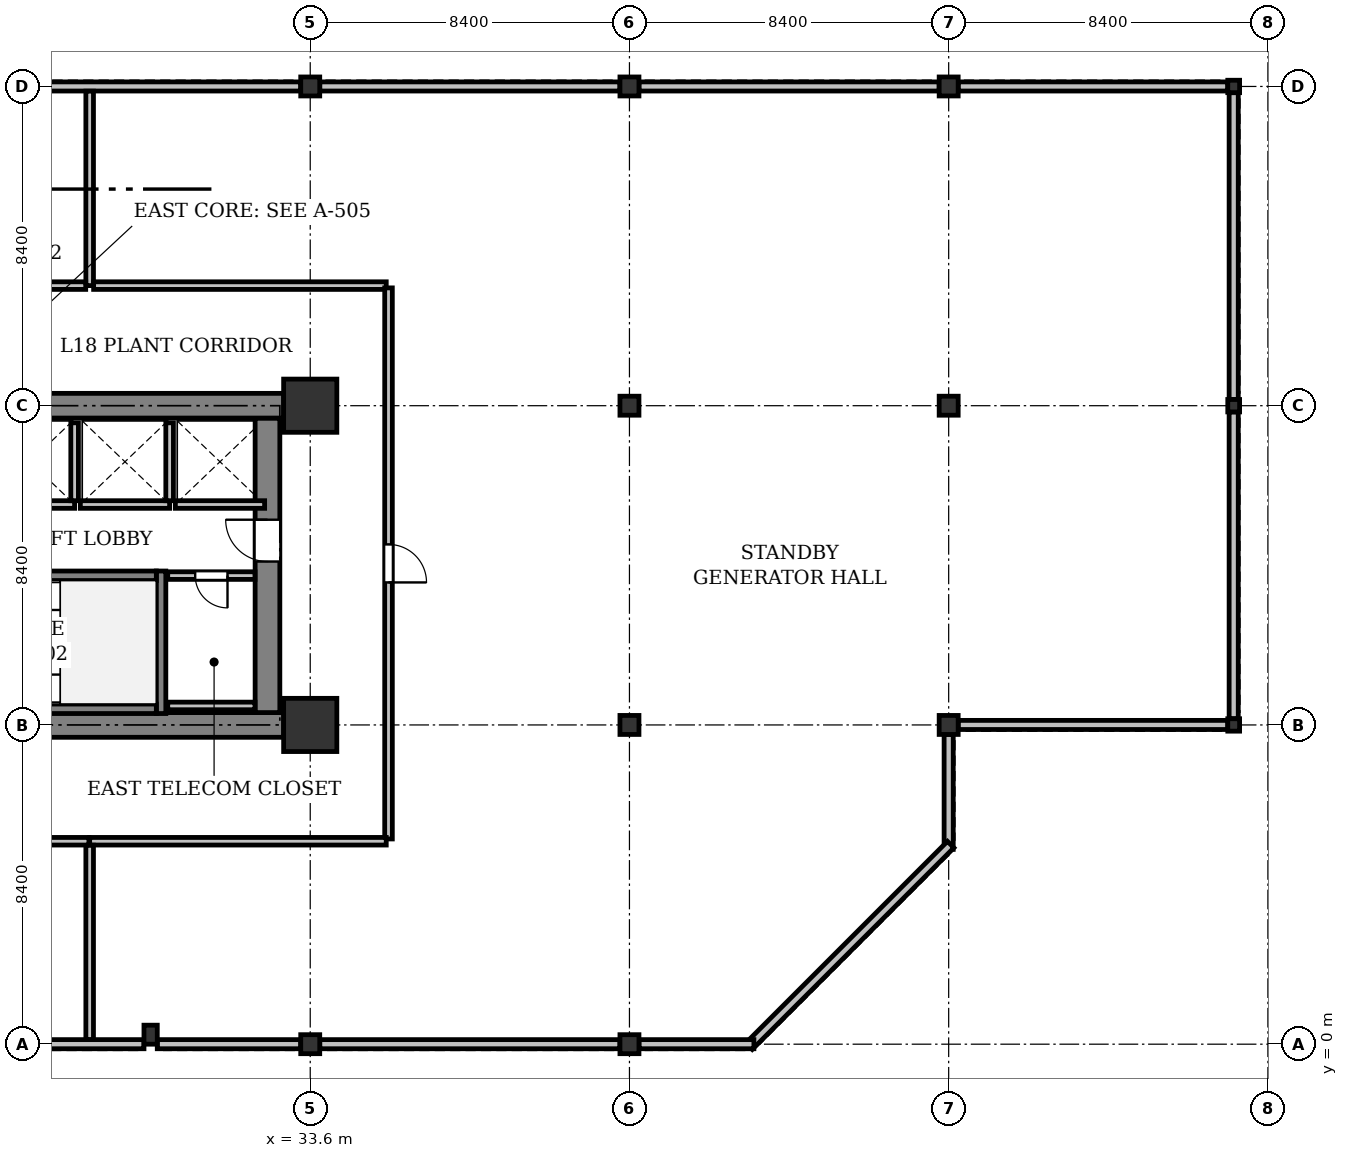
"""IFC4 building model, lengths in metres.
Left out: names, types, materials, properties, quantities, classifications, styles, units other than length and angle.
Written with IfcOpenShell. Run it as: python <this file> out.ifc"""

import sys

from ifc_helpers import new_model, si_unit, direction, frame, frame_2d, origin, origin_2d, place, context, subcontext, project, spatial, rectangle, i_section, extrude, element, fill, save


model = new_model("IFC4")
c1 = context("Model", 3, precision=1e-05, world=origin(), true_north=direction((0.0, 1.0)))
c2 = subcontext(c1, "Body", "Model", "MODEL_VIEW")
j1 = project(units=[si_unit("LENGTHUNIT", "METRE"), si_unit("PLANEANGLEUNIT", "RADIAN")], contexts=[c1])
p1 = place(None, origin())
s1 = spatial("IfcSite", under=j1, at=p1, CompositionType="ELEMENT")
p2 = place(p1, origin())
s2 = spatial("IfcBuilding", under=s1, at=p2, CompositionType="ELEMENT")
p3 = place(p2, frame((0.0, 0.0, 79.4)))
s3 = spatial("IfcBuildingStorey", under=s2, at=p3, CompositionType="ELEMENT", Elevation=79.4)
p4 = place(p3, frame((33.6, 0.0, 0.0), z_axis=(0.0, 0.0, 1.0), x_axis=(1.0, 0.0, 0.0)))
e1 = element("IfcColumn", 1, at=p4, inside=s3, PredefinedType="COLUMN", context=c2, shape_type="SweptSolid", body=[
    extrude(i_section(OverallWidth=0.5, OverallDepth=0.5, WebThickness=0.028, FlangeThickness=0.04, at=origin_2d()), origin(), (0.0, 0.0, 1.0), 5.0),
])
for number, where, z_axis, x_axis in (
    (2, (33.6, 8.4, 0.0), (0.0, 0.0, 1.0), (1.0, 0.0, 0.0)),
    (3, (33.6, 16.8, 0.0), (0.0, 0.0, 1.0), (1.0, 0.0, 0.0)),
):
    element("IfcColumn", number, at=place(p3, frame(where, z_axis=z_axis, x_axis=x_axis)), inside=s3, PredefinedType="COLUMN", context=c2, shape_type="SweptSolid", body=[
        extrude(rectangle(XDim=1.4, YDim=1.4, at=origin_2d()), origin(), (0.0, 0.0, 1.0), 5.0),
    ])
for number, where, z_axis, x_axis in (
    (4, (33.6, 25.2, 0.0), (0.0, 0.0, 1.0), (1.0, 0.0, 0.0)),
    (5, (42.0, 0.0, 0.0), (0.0, 0.0, 1.0), (1.0, 0.0, 0.0)),
    (6, (42.0, 8.4, 0.0), (0.0, 0.0, 1.0), (1.0, 0.0, 0.0)),
    (7, (42.0, 16.8, 0.0), (0.0, 0.0, 1.0), (1.0, 0.0, 0.0)),
    (8, (42.0, 25.2, 0.0), (0.0, 0.0, 1.0), (1.0, 0.0, 0.0)),
    (9, (50.4, 8.4, 0.0), (0.0, 0.0, 1.0), (1.0, 0.0, 0.0)),
    (10, (50.4, 16.8, 0.0), (0.0, 0.0, 1.0), (1.0, 0.0, 0.0)),
    (11, (50.4, 25.2, 0.0), (0.0, 0.0, 1.0), (1.0, 0.0, 0.0)),
):
    element("IfcColumn", number, at=place(p3, frame(where, z_axis=z_axis, x_axis=x_axis)), inside=s3, PredefinedType="COLUMN", context=c2, shape_type="SweptSolid", body=[
        extrude(i_section(OverallWidth=0.5, OverallDepth=0.5, WebThickness=0.028, FlangeThickness=0.04, at=origin_2d()), origin(), (0.0, 0.0, 1.0), 5.0),
    ])
for number, where, z_axis, x_axis in (
    (12, (57.9, 8.4, 0.0), (0.0, 0.0, 1.0), (1.0, 0.0, 0.0)),
    (13, (57.9, 16.8, 0.0), (0.0, 0.0, 1.0), (1.0, 0.0, 0.0)),
    (14, (57.9, 25.2, 0.0), (0.0, 0.0, 1.0), (1.0, 0.0, 0.0)),
):
    element("IfcColumn", number, at=place(p3, frame(where, z_axis=z_axis, x_axis=x_axis)), inside=s3, PredefinedType="COLUMN", context=c2, shape_type="SweptSolid", body=[
        extrude(i_section(OverallWidth=0.311, OverallDepth=0.327, WebThickness=0.016, FlangeThickness=0.025, FilletRadius=0.017, at=origin_2d()), origin(), (0.0, 0.0, 1.0), 5.0),
    ])
p5 = place(p3, frame((29.4, 0.25, 0.0), z_axis=(0.0, 0.0, 1.0), x_axis=(1.0, 0.0, 0.0)))
e15 = element("IfcColumn", 15, at=p5, inside=s3, PredefinedType="PILASTER", context=c2, shape_type="SweptSolid", body=[
    extrude(rectangle(XDim=0.35, YDim=0.5, at=origin_2d()), origin(), (0.0, 0.0, 1.0), 5.0),
])
p6 = place(p3, frame((57.9, 25.037, 0.0), z_axis=(0.0, 0.0, 1.0), x_axis=(0.0, -1.0, 0.0)))
e16 = element("IfcWall", 16, at=p6, inside=s3, PredefinedType="STANDARD", context=c2, shape_type="SweptSolid", body=[
    extrude(rectangle(XDim=8.073, YDim=0.24, at=frame_2d((4.037, 0.0))), origin(), (0.0, 0.0, 1.0), 4.322),
])
p7 = place(p3, frame((57.9, 16.636, 0.0), z_axis=(0.0, 0.0, 1.0), x_axis=(0.0, -1.0, 0.0)))
e17 = element("IfcWall", 17, at=p7, inside=s3, PredefinedType="STANDARD", context=c2, shape_type="SweptSolid", body=[
    extrude(rectangle(XDim=8.073, YDim=0.24, at=frame_2d((4.037, 0.0))), origin(), (0.0, 0.0, 1.0), 4.322),
])
p8 = place(p3, frame((57.744, 8.4, 0.0), z_axis=(0.0, 0.0, 1.0), x_axis=(-1.0, 0.0, 0.0)))
e18 = element("IfcWall", 18, at=p8, inside=s3, PredefinedType="STANDARD", context=c2, shape_type="SweptSolid", body=[
    extrude(rectangle(XDim=7.094, YDim=0.24, at=frame_2d((3.547, 0.0))), origin(), (0.0, 0.0, 1.0), 3.815),
])
p9 = place(p3, frame((50.4, 8.15, 0.0), z_axis=(0.0, 0.0, 1.0), x_axis=(0.0, -1.0, 0.0)))
e19 = element("IfcWall", 19, at=p9, inside=s3, PredefinedType="STANDARD", context=c2, shape_type="SweptSolid", body=[
    extrude(rectangle(XDim=3.025, YDim=0.24, at=frame_2d((1.512, 0.0))), origin(), (0.0, 0.0, 1.0), 4.725),
])
p10 = place(p3, frame((50.453, 5.253, 0.0), z_axis=(0.0, 0.0, 1.0), x_axis=(-0.707123050166, -0.707090511833, 0.0)))
e20 = element("IfcWall", 20, at=p10, inside=s3, PredefinedType="STANDARD", context=c2, shape_type="SweptSolid", body=[
    extrude(rectangle(XDim=7.503, YDim=0.24, at=frame_2d((3.751, 0.0))), origin(), (0.0, 0.0, 1.0), 4.725),
])
p11 = place(p3, frame((45.275, 0.0, 0.0), z_axis=(0.0, 0.0, 1.0), x_axis=(-1.0, 0.0, 0.0)))
e21 = element("IfcWall", 21, at=p11, inside=s3, PredefinedType="STANDARD", context=c2, shape_type="SweptSolid", body=[
    extrude(rectangle(XDim=3.025, YDim=0.24, at=frame_2d((1.512, 0.0))), origin(), (0.0, 0.0, 1.0), 4.725),
])
p12 = place(p3, frame((41.75, 0.0, 0.0), z_axis=(0.0, 0.0, 1.0), x_axis=(-1.0, 0.0, 0.0)))
e22 = element("IfcWall", 22, at=p12, inside=s3, PredefinedType="STANDARD", context=c2, shape_type="SweptSolid", body=[
    extrude(rectangle(XDim=7.9, YDim=0.24, at=frame_2d((3.95, 0.0))), origin(), (0.0, 0.0, 1.0), 4.425),
])
for number, where, z_axis, x_axis in (
    (23, (33.35, 0.0, 0.0), (0.0, 0.0, 1.0), (-1.0, 0.0, 0.0)),
    (24, (29.225, 0.0, 0.0), (0.0, 0.0, 1.0), (-1.0, 0.0, 0.0)),
):
    element("IfcWall", number, at=place(p3, frame(where, z_axis=z_axis, x_axis=x_axis)), inside=s3, PredefinedType="STANDARD", context=c2, shape_type="SweptSolid", body=[
        extrude(rectangle(XDim=3.775, YDim=0.24, at=frame_2d((1.888, 0.0))), origin(), (0.0, 0.0, 1.0), 4.425),
    ])
p13 = place(p3, frame((25.45, 25.2, 0.0), z_axis=(0.0, 0.0, 1.0), x_axis=(1.0, 0.0, 0.0)))
e25 = element("IfcWall", 25, at=p13, inside=s3, PredefinedType="STANDARD", context=c2, shape_type="SweptSolid", body=[
    extrude(rectangle(XDim=7.9, YDim=0.24, at=frame_2d((3.95, 0.0))), origin(), (0.0, 0.0, 1.0), 3.825),
])
for number, where, z_axis, x_axis in (
    (26, (33.85, 25.2, 0.0), (0.0, 0.0, 1.0), (1.0, 0.0, 0.0)),
    (27, (42.25, 25.2, 0.0), (0.0, 0.0, 1.0), (1.0, 0.0, 0.0)),
):
    element("IfcWall", number, at=place(p3, frame(where, z_axis=z_axis, x_axis=x_axis)), inside=s3, PredefinedType="STANDARD", context=c2, shape_type="SweptSolid", body=[
        extrude(rectangle(XDim=7.9, YDim=0.24, at=frame_2d((3.95, 0.0))), origin(), (0.0, 0.0, 1.0), 3.825),
    ])
p14 = place(p3, frame((50.65, 25.2, 0.0), z_axis=(0.0, 0.0, 1.0), x_axis=(1.0, 0.0, 0.0)))
e28 = element("IfcWall", 28, at=p14, inside=s3, PredefinedType="STANDARD", context=c2, shape_type="SweptSolid", body=[
    extrude(rectangle(XDim=7.094, YDim=0.24, at=frame_2d((3.547, 0.0))), origin(), (0.0, 0.0, 1.0), 3.815),
])
p15 = place(p3, frame((25.9, 8.4, 0.0), z_axis=(0.0, 0.0, 1.0), x_axis=(1.0, 0.0, 0.0)))
e29 = element("IfcWall", 29, at=p15, inside=s3, PredefinedType="SHEAR", context=c2, shape_type="SweptSolid", body=[
    extrude(rectangle(XDim=7.0, YDim=0.65, at=frame_2d((3.5, 0.0))), origin(), (0.0, 0.0, 1.0), 4.725),
])
p16 = place(p3, frame((32.475, 8.725, 0.0), z_axis=(0.0, 0.0, 1.0), x_axis=(0.0, 1.0, 0.0)))
e30 = element("IfcWall", 30, at=p16, inside=s3, PredefinedType="SHEAR", context=c2, shape_type="SweptSolid", body=[
    extrude(rectangle(XDim=7.75, YDim=0.65, at=frame_2d((3.875, 0.0))), origin(), (0.0, 0.0, 1.0), 4.725),
])
p17 = place(p16, frame((3.975, 0.0, 0.0)))
e31 = element("IfcOpeningElement", 31, at=p17, cuts=e30, PredefinedType="OPENING", context=c2, shape_type="SweptSolid", body=[
    extrude(rectangle(XDim=1.1, YDim=2.15, at=frame_2d((0.55, 1.075))), frame((0.0, 0.335, 0.0), z_axis=(0.0, -1.0, 0.0), x_axis=(1.0, 0.0, 0.0)), (0.0, 0.0, 1.0), 0.67),
])
p18 = place(p3, frame((25.9, 16.8, 0.0), z_axis=(0.0, 0.0, 1.0), x_axis=(1.0, 0.0, 0.0)))
e32 = element("IfcWall", 32, at=p18, inside=s3, PredefinedType="SHEAR", context=c2, shape_type="SweptSolid", body=[
    extrude(rectangle(XDim=7.0, YDim=0.65, at=frame_2d((3.5, 0.0))), origin(), (0.0, 0.0, 1.0), 4.725),
])
p19 = place(p3, frame((29.675, 8.7, 0.0), z_axis=(0.0, 0.0, 1.0), x_axis=(0.0, 1.0, 0.0)))
e33 = element("IfcWall", 33, at=p19, inside=s3, PredefinedType="SHEAR", context=c2, shape_type="SweptSolid", body=[
    extrude(rectangle(XDim=3.75, YDim=0.25, at=frame_2d((1.875, 0.0))), origin(), (0.0, 0.0, 1.0), 4.725),
])
p20 = place(p3, frame((21.8, 8.825, 0.0), z_axis=(0.0, 0.0, 1.0), x_axis=(1.0, 0.0, 0.0)))
e34 = element("IfcWall", 34, at=p20, inside=s3, PredefinedType="SHEAR", context=c2, shape_type="SweptSolid", body=[
    extrude(rectangle(XDim=7.75, YDim=0.25, at=frame_2d((3.875, 0.0))), origin(), (0.0, 0.0, 1.0), 4.725),
])
p21 = place(p3, frame((21.8, 12.325, 0.0), z_axis=(0.0, 0.0, 1.0), x_axis=(1.0, 0.0, 0.0)))
e35 = element("IfcWall", 35, at=p21, inside=s3, PredefinedType="SHEAR", context=c2, shape_type="SweptSolid", body=[
    extrude(rectangle(XDim=7.75, YDim=0.25, at=frame_2d((3.875, 0.0))), origin(), (0.0, 0.0, 1.0), 4.725),
])
p22 = place(p21, frame((0.22, 0.0, 0.0)))
e36 = element("IfcOpeningElement", 36, at=p22, cuts=e35, PredefinedType="OPENING", context=c2, shape_type="SweptSolid", body=[
    extrude(rectangle(XDim=1.1, YDim=2.15, at=frame_2d((0.55, 1.075))), frame((0.0, 0.135, 0.0), z_axis=(0.0, -1.0, 0.0), x_axis=(1.0, 0.0, 0.0)), (0.0, 0.0, 1.0), 0.27),
])
p23 = place(p3, frame((25.05, 14.2, 0.0), z_axis=(0.0, 0.0, 1.0), x_axis=(1.0, 0.0, 0.0)))
e37 = element("IfcWall", 37, at=p23, inside=s3, PredefinedType="PARTITIONING", context=c2, shape_type="SweptSolid", body=[
    extrude(rectangle(XDim=2.35, YDim=0.2, at=frame_2d((1.175, 0.0))), origin(), (0.0, 0.0, 1.0), 4.725),
])
p24 = place(p3, frame((27.4, 14.3, 0.0), z_axis=(0.0, 0.0, 1.0), x_axis=(0.0, 1.0, 0.0)))
e38 = element("IfcWall", 38, at=p24, inside=s3, PredefinedType="PARTITIONING", context=c2, shape_type="SweptSolid", body=[
    extrude(rectangle(XDim=2.05, YDim=0.2, at=frame_2d((1.025, 0.0))), origin(), (0.0, 0.0, 1.0), 4.725),
])
p25 = place(p3, frame((27.55, 14.2, 0.0), z_axis=(0.0, 0.0, 1.0), x_axis=(1.0, 0.0, 0.0)))
e39 = element("IfcWall", 39, at=p25, inside=s3, PredefinedType="PARTITIONING", context=c2, shape_type="SweptSolid", body=[
    extrude(rectangle(XDim=2.35, YDim=0.2, at=frame_2d((1.175, 0.0))), origin(), (0.0, 0.0, 1.0), 4.725),
])
p26 = place(p3, frame((29.9, 14.3, 0.0), z_axis=(0.0, 0.0, 1.0), x_axis=(0.0, 1.0, 0.0)))
e40 = element("IfcWall", 40, at=p26, inside=s3, PredefinedType="PARTITIONING", context=c2, shape_type="SweptSolid", body=[
    extrude(rectangle(XDim=2.05, YDim=0.2, at=frame_2d((1.025, 0.0))), origin(), (0.0, 0.0, 1.0), 4.725),
])
p27 = place(p3, frame((30.05, 14.2, 0.0), z_axis=(0.0, 0.0, 1.0), x_axis=(1.0, 0.0, 0.0)))
e41 = element("IfcWall", 41, at=p27, inside=s3, PredefinedType="PARTITIONING", context=c2, shape_type="SweptSolid", body=[
    extrude(rectangle(XDim=2.35, YDim=0.2, at=frame_2d((1.175, 0.0))), origin(), (0.0, 0.0, 1.0), 4.725),
])
p28 = place(p3, frame((32.146, 12.33, 0.0), z_axis=(0.0, 0.0, 1.0), x_axis=(-1.0, 0.0, 0.0)))
e42 = element("IfcWall", 42, at=p28, inside=s3, PredefinedType="PARTITIONING", context=c2, shape_type="SweptSolid", body=[
    extrude(rectangle(XDim=2.296, YDim=0.2, at=frame_2d((1.148, 0.0))), origin(), (0.0, 0.0, 1.0), 4.725),
])
p29 = place(p28, frame((0.723, 0.0, 0.0)))
e43 = element("IfcOpeningElement", 43, at=p29, cuts=e42, PredefinedType="OPENING", context=c2, shape_type="SweptSolid", body=[
    extrude(rectangle(XDim=0.85, YDim=2.15, at=frame_2d((0.425, 1.075))), frame((0.0, 0.11, 0.0), z_axis=(0.0, -1.0, 0.0), x_axis=(1.0, 0.0, 0.0)), (0.0, 0.0, 1.0), 0.22),
])
p30 = place(p3, frame((29.85, 8.9, 0.0), z_axis=(0.0, 0.0, 1.0), x_axis=(1.0, 0.0, 0.0)))
e44 = element("IfcWall", 44, at=p30, inside=s3, PredefinedType="PARTITIONING", context=c2, shape_type="SweptSolid", body=[
    extrude(rectangle(XDim=2.296, YDim=0.2, at=frame_2d((1.148, 0.0))), origin(), (0.0, 0.0, 1.0), 4.725),
])
p31 = place(p3, frame((27.796, 25.076, 0.0), z_axis=(0.0, 0.0, 1.0), x_axis=(0.0, -1.0, 0.0)))
e45 = element("IfcWall", 45, at=p31, inside=s3, PredefinedType="PARTITIONING", context=c2, shape_type="SweptSolid", body=[
    extrude(rectangle(XDim=5.116, YDim=0.2, at=frame_2d((2.558, 0.0))), origin(), (0.0, 0.0, 1.0), 3.825),
])
p32 = place(p3, frame((27.9, 19.96, 0.0), z_axis=(0.0, 0.0, 1.0), x_axis=(1.0, 0.0, 0.0)))
e46 = element("IfcWall", 46, at=p32, inside=s3, PredefinedType="PARTITIONING", context=c2, shape_type="SweptSolid", body=[
    extrude(rectangle(XDim=7.7, YDim=0.2, at=frame_2d((3.85, 0.0))), origin(), (0.0, 0.0, 1.0), 3.709),
])
p33 = place(p3, frame((35.66, 19.9, 0.0), z_axis=(0.0, 0.0, 1.0), x_axis=(0.0, -1.0, 0.0)))
e47 = element("IfcWall", 47, at=p33, inside=s3, PredefinedType="PARTITIONING", context=c2, shape_type="SweptSolid", body=[
    extrude(rectangle(XDim=14.5, YDim=0.2, at=frame_2d((7.25, 0.0))), origin(), (0.0, 0.0, 1.0), 3.825),
])
p34 = place(p33, frame((6.75, 0.0, 0.0)))
e48 = element("IfcOpeningElement", 48, at=p34, cuts=e47, PredefinedType="OPENING", context=c2, shape_type="SweptSolid", body=[
    extrude(rectangle(XDim=1.0, YDim=2.15, at=frame_2d((0.5, 1.075))), frame((0.0, 0.11, 0.0), z_axis=(0.0, -1.0, 0.0), x_axis=(1.0, 0.0, 0.0)), (0.0, 0.0, 1.0), 0.22),
])
p35 = place(p3, frame((35.6, 5.34, 0.0), z_axis=(0.0, 0.0, 1.0), x_axis=(-1.0, 0.0, 0.0)))
e49 = element("IfcWall", 49, at=p35, inside=s3, PredefinedType="PARTITIONING", context=c2, shape_type="SweptSolid", body=[
    extrude(rectangle(XDim=7.804, YDim=0.2, at=frame_2d((3.902, 0.0))), origin(), (0.0, 0.0, 1.0), 3.709),
])
p36 = place(p3, frame((27.796, 5.236, 0.0), z_axis=(0.0, 0.0, 1.0), x_axis=(0.0, -1.0, 0.0)))
e50 = element("IfcWall", 50, at=p36, inside=s3, PredefinedType="PARTITIONING", context=c2, shape_type="SweptSolid", body=[
    extrude(rectangle(XDim=5.112, YDim=0.2, at=frame_2d((2.556, 0.0))), origin(), (0.0, 0.0, 1.0), 4.725),
])
p37 = place(p3, frame((27.776, 5.34, 0.0), z_axis=(0.0, 0.0, 1.0), x_axis=(-1.0, 0.0, 0.0)))
e51 = element("IfcWall", 51, at=p37, inside=s3, PredefinedType="PARTITIONING", context=c2, shape_type="SweptSolid", body=[
    extrude(rectangle(XDim=13.626, YDim=0.2, at=frame_2d((6.813, 0.0))), origin(), (0.0, 0.0, 1.0), 3.709),
])
p38 = place(p3, frame((20.064, 19.96, 0.0), z_axis=(0.0, 0.0, 1.0), x_axis=(1.0, 0.0, 0.0)))
e52 = element("IfcWall", 52, at=p38, inside=s3, PredefinedType="PARTITIONING", context=c2, shape_type="SweptSolid", body=[
    extrude(rectangle(XDim=7.628, YDim=0.2, at=frame_2d((3.814, 0.0))), origin(), (0.0, 0.0, 1.0), 3.709),
])
p39 = place(p17, origin())
e53 = element("IfcDoor", 53, at=p39, inside=s3, OperationType="SINGLE_SWING_RIGHT", PredefinedType="DOOR", context=c2, shape_type="SweptSolid", body=[
    extrude(rectangle(XDim=1.1, YDim=2.15, at=frame_2d((0.55, 1.075))), frame((0.0, 0.025, 0.0), z_axis=(0.0, -1.0, 0.0), x_axis=(1.0, 0.0, 0.0)), (0.0, 0.0, 1.0), 0.05),
])
fill(e31, e53)
p40 = place(p29, origin())
e54 = element("IfcDoor", 54, at=p40, inside=s3, OperationType="SINGLE_SWING_LEFT", PredefinedType="DOOR", context=c2, shape_type="SweptSolid", body=[
    extrude(rectangle(XDim=0.85, YDim=2.15, at=frame_2d((0.425, 1.075))), frame((0.0, 0.025, 0.0), z_axis=(0.0, -1.0, 0.0), x_axis=(1.0, 0.0, 0.0)), (0.0, 0.0, 1.0), 0.05),
])
fill(e43, e54)
p41 = place(p34, origin())
e55 = element("IfcDoor", 55, at=p41, inside=s3, OperationType="SINGLE_SWING_RIGHT", PredefinedType="DOOR", context=c2, shape_type="SweptSolid", body=[
    extrude(rectangle(XDim=1.0, YDim=2.15, at=frame_2d((0.5, 1.075))), frame((0.0, 0.025, 0.0), z_axis=(0.0, -1.0, 0.0), x_axis=(1.0, 0.0, 0.0)), (0.0, 0.0, 1.0), 0.05),
])
fill(e48, e55)
save(model, sys.argv[1])
